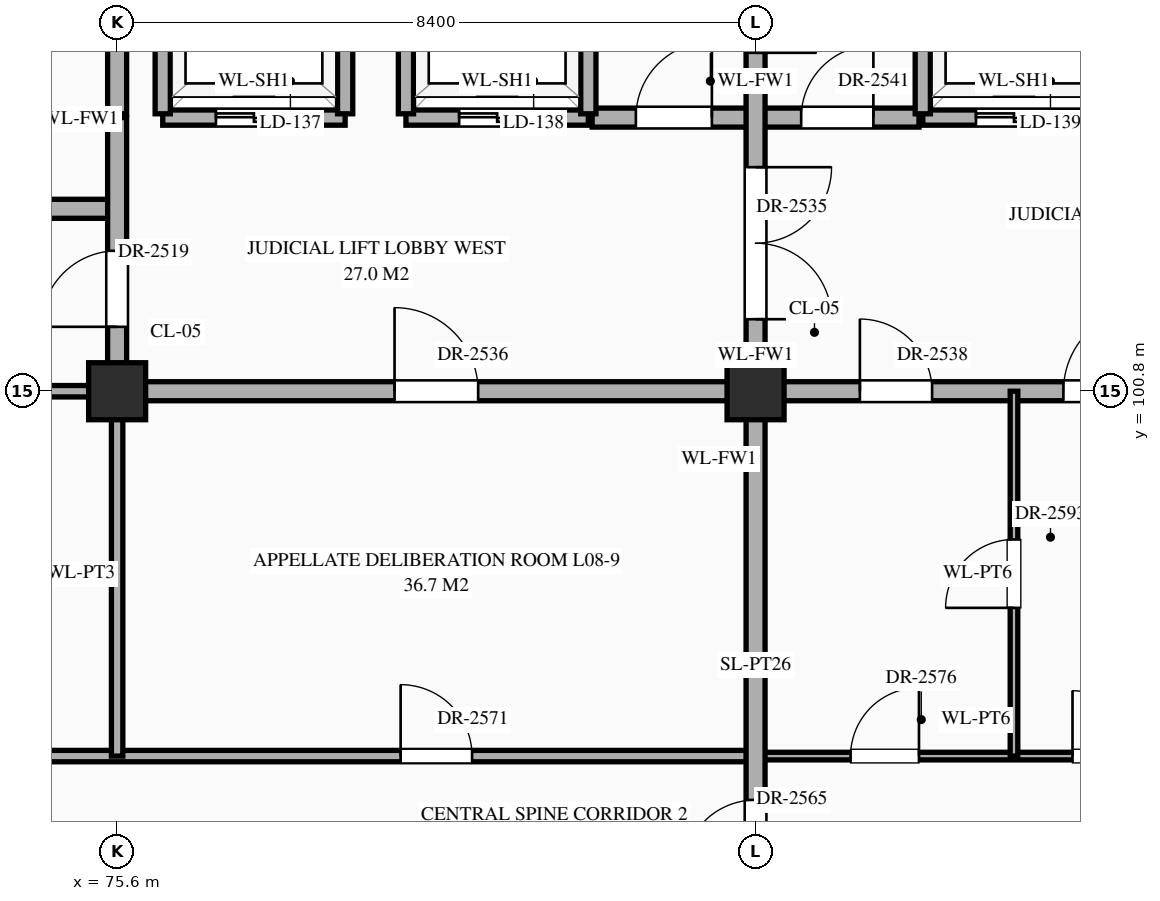
"""IFC4 building model, lengths in metres.
Left out: names, types, materials, properties, quantities, classifications, styles, units other than length and angle.
Written with IfcOpenShell. Run it as: python <this file> out.ifc"""

import sys

from ifc_helpers import new_model, si_unit, direction, frame, frame_2d, origin, origin_2d, place, context, subcontext, project, spatial, rectangle, extrude, element, fill, save


model = new_model("IFC4")
c1 = context("Model", 3, precision=1e-05, world=origin(), true_north=direction((0.0, 1.0)))
c2 = subcontext(c1, "Body", "Model", "MODEL_VIEW")
j1 = project(units=[si_unit("LENGTHUNIT", "METRE"), si_unit("PLANEANGLEUNIT", "RADIAN")], contexts=[c1])
p1 = place(None, origin())
s1 = spatial("IfcSite", under=j1, at=p1, CompositionType="ELEMENT")
p2 = place(p1, origin())
s2 = spatial("IfcBuilding", under=s1, at=p2, CompositionType="ELEMENT")
p3 = place(p2, frame((0.0, 0.0, 35.1)))
s3 = spatial("IfcBuildingStorey", under=s2, at=p3, CompositionType="ELEMENT", Elevation=35.1)
for number, where, z_axis, x_axis in (
    (1, (75.6, 100.8, 0.0), (0.0, 0.0, 1.0), (1.0, 0.0, 0.0)),
    (2, (84.0, 100.8, 0.0), (0.0, 0.0, 1.0), (1.0, 0.0, 0.0)),
):
    element("IfcColumn", number, at=place(p3, frame(where, z_axis=z_axis, x_axis=x_axis)), inside=s3, PredefinedType="COLUMN", context=c2, shape_type="SweptSolid", body=[
        extrude(rectangle(XDim=0.75, YDim=0.75, at=origin_2d()), origin(), (0.0, 0.0, 1.0), 4.2),
    ])
p4 = place(p3, frame((56.2, 96.0, 0.0), z_axis=(0.0, 0.0, 1.0), x_axis=(1.0, 0.0, 0.0)))
e3 = element("IfcWall", 3, at=p4, inside=s3, PredefinedType="STANDARD", context=c2, shape_type="SweptSolid", body=[
    extrude(rectangle(XDim=27.8, YDim=0.15, at=frame_2d((13.9, 0.0))), origin(), (0.0, 0.0, 1.0), 3.95),
])
p5 = place(p4, frame((0.7, 0.0, 0.0)))
e4 = element("IfcOpeningElement", 4, at=p5, cuts=e3, PredefinedType="OPENING", context=c2, shape_type="SweptSolid", body=[
    extrude(rectangle(XDim=1.2, YDim=2.35, at=frame_2d((0.6, 1.175))), frame((0.0, 0.087, 0.0), z_axis=(0.0, -1.0, 0.0), x_axis=(1.0, 0.0, 0.0)), (0.0, 0.0, 1.0), 0.174),
])
p6 = place(p4, frame((6.18, 0.0, 0.0)))
e5 = element("IfcOpeningElement", 5, at=p6, cuts=e3, PredefinedType="OPENING", context=c2, shape_type="SweptSolid", body=[
    extrude(rectangle(XDim=1.24, YDim=2.3, at=frame_2d((0.62, 1.15))), frame((0.0, 0.087, 0.0), z_axis=(0.0, -1.0, 0.0), x_axis=(1.0, 0.0, 0.0)), (0.0, 0.0, 1.0), 0.174),
])
p7 = place(p4, frame((14.56, 0.0, 0.0)))
e6 = element("IfcOpeningElement", 6, at=p7, cuts=e3, PredefinedType="OPENING", context=c2, shape_type="SweptSolid", body=[
    extrude(rectangle(XDim=1.28, YDim=2.35, at=frame_2d((0.64, 1.175))), frame((0.0, 0.087, 0.0), z_axis=(0.0, -1.0, 0.0), x_axis=(1.0, 0.0, 0.0)), (0.0, 0.0, 1.0), 0.174),
])
p8 = place(p4, frame((23.13, 0.0, 0.0)))
e7 = element("IfcOpeningElement", 7, at=p8, cuts=e3, PredefinedType="OPENING", context=c2, shape_type="SweptSolid", body=[
    extrude(rectangle(XDim=0.94, YDim=2.3, at=frame_2d((0.47, 1.15))), frame((0.0, 0.087, 0.0), z_axis=(0.0, -1.0, 0.0), x_axis=(1.0, 0.0, 0.0)), (0.0, 0.0, 1.0), 0.174),
])
p9 = place(p3, frame((84.0, 96.0, 0.0), z_axis=(0.0, 0.0, 1.0), x_axis=(1.0, 0.0, 0.0)))
e8 = element("IfcWall", 8, at=p9, inside=s3, PredefinedType="STANDARD", context=c2, shape_type="SweptSolid", body=[
    extrude(rectangle(XDim=5.8, YDim=0.1, at=frame_2d((2.9, 0.0))), origin(), (0.0, 0.0, 1.0), 3.95),
])
p10 = place(p9, frame((1.25, 0.0, 0.0)))
e9 = element("IfcOpeningElement", 9, at=p10, cuts=e8, PredefinedType="OPENING", context=c2, shape_type="SweptSolid", body=[
    extrude(rectangle(XDim=0.9, YDim=2.15, at=frame_2d((0.45, 1.075))), frame((0.0, 0.062, 0.0), z_axis=(0.0, -1.0, 0.0), x_axis=(1.0, 0.0, 0.0)), (0.0, 0.0, 1.0), 0.124),
])
p11 = place(p9, frame((4.17, 0.0, 0.0)))
e10 = element("IfcOpeningElement", 10, at=p11, cuts=e8, PredefinedType="OPENING", context=c2, shape_type="SweptSolid", body=[
    extrude(rectangle(XDim=0.86, YDim=2.1, at=frame_2d((0.43, 1.05))), frame((0.0, 0.062, 0.0), z_axis=(0.0, -1.0, 0.0), x_axis=(1.0, 0.0, 0.0)), (0.0, 0.0, 1.0), 0.124),
])
p12 = place(p3, frame((71.4, 100.8, 0.0), z_axis=(0.0, 0.0, 1.0), x_axis=(1.0, 0.0, 0.0)))
e11 = element("IfcWall", 11, at=p12, inside=s3, PredefinedType="STANDARD", context=c2, shape_type="SweptSolid", body=[
    extrude(rectangle(XDim=4.2, YDim=0.15, at=frame_2d((2.1, 0.0))), origin(), (0.0, 0.0, 1.0), 3.1),
])
p13 = place(p12, frame((1.482, 0.0, 0.0)))
e12 = element("IfcOpeningElement", 12, at=p13, cuts=e11, PredefinedType="OPENING", context=c2, shape_type="SweptSolid", body=[
    extrude(rectangle(XDim=0.94, YDim=2.3, at=frame_2d((0.47, 1.15))), frame((0.0, 0.087, 0.0), z_axis=(0.0, -1.0, 0.0), x_axis=(1.0, 0.0, 0.0)), (0.0, 0.0, 1.0), 0.174),
])
p14 = place(p3, frame((75.6, 100.8, 0.0), z_axis=(0.0, 0.0, 1.0), x_axis=(1.0, 0.0, 0.0)))
e13 = element("IfcWall", 13, at=p14, inside=s3, PredefinedType="STANDARD", context=c2, shape_type="SweptSolid", body=[
    extrude(rectangle(XDim=16.8, YDim=0.25, at=frame_2d((8.4, 0.0))), origin(), (0.0, 0.0, 1.0), 3.1),
])
p15 = place(p14, frame((3.65, 0.0, 0.0)))
e14 = element("IfcOpeningElement", 14, at=p15, cuts=e13, PredefinedType="OPENING", context=c2, shape_type="SweptSolid", body=[
    extrude(rectangle(XDim=1.1, YDim=2.2, at=frame_2d((0.55, 1.1))), frame((0.0, 0.137, 0.0), z_axis=(0.0, -1.0, 0.0), x_axis=(1.0, 0.0, 0.0)), (0.0, 0.0, 1.0), 0.274),
])
p16 = place(p14, frame((9.772, 0.0, 0.0)))
e15 = element("IfcOpeningElement", 15, at=p16, cuts=e13, PredefinedType="OPENING", context=c2, shape_type="SweptSolid", body=[
    extrude(rectangle(XDim=0.95, YDim=2.15, at=frame_2d((0.475, 1.075))), frame((0.0, 0.137, 0.0), z_axis=(0.0, -1.0, 0.0), x_axis=(1.0, 0.0, 0.0)), (0.0, 0.0, 1.0), 0.274),
])
p17 = place(p14, frame((12.45, 0.0, 0.0)))
e16 = element("IfcOpeningElement", 16, at=p17, cuts=e13, PredefinedType="OPENING", context=c2, shape_type="SweptSolid", body=[
    extrude(rectangle(XDim=1.1, YDim=2.2, at=frame_2d((0.55, 1.1))), frame((0.0, 0.137, 0.0), z_axis=(0.0, -1.0, 0.0), x_axis=(1.0, 0.0, 0.0)), (0.0, 0.0, 1.0), 0.274),
])
p18 = place(p14, frame((14.853, 0.0, 0.0)))
e17 = element("IfcOpeningElement", 17, at=p18, cuts=e13, PredefinedType="OPENING", context=c2, shape_type="SweptSolid", body=[
    extrude(rectangle(XDim=1.0, YDim=2.2, at=frame_2d((0.5, 1.1))), frame((0.0, 0.137, 0.0), z_axis=(0.0, -1.0, 0.0), x_axis=(1.0, 0.0, 0.0)), (0.0, 0.0, 1.0), 0.274),
])
p19 = place(p3, frame((71.4, 103.2, 0.0), z_axis=(0.0, 0.0, 1.0), x_axis=(1.0, 0.0, 0.0)))
e18 = element("IfcWall", 18, at=p19, inside=s3, PredefinedType="STANDARD", context=c2, shape_type="SweptSolid", body=[
    extrude(rectangle(XDim=4.2, YDim=0.25, at=frame_2d((2.1, 0.0))), origin(), (0.0, 0.0, 1.0), 3.95),
])
p20 = place(p19, frame((1.55, 0.0, 0.0)))
e19 = element("IfcOpeningElement", 19, at=p20, cuts=e18, PredefinedType="OPENING", context=c2, shape_type="SweptSolid", body=[
    extrude(rectangle(XDim=1.1, YDim=2.2, at=frame_2d((0.55, 1.1))), frame((0.0, 0.137, 0.0), z_axis=(0.0, -1.0, 0.0), x_axis=(1.0, 0.0, 0.0)), (0.0, 0.0, 1.0), 0.274),
])
p21 = place(p3, frame((76.2, 104.4, 0.0), z_axis=(0.0, 0.0, 1.0), x_axis=(1.0, 0.0, 0.0)))
e20 = element("IfcWall", 20, at=p21, inside=s3, PredefinedType="STANDARD", context=c2, shape_type="SweptSolid", body=[
    extrude(rectangle(XDim=2.4, YDim=0.2, at=frame_2d((1.2, 0.0))), origin(), (0.0, 0.0, 1.0), 3.95),
])
p22 = place(p21, frame((0.7, 0.0, 0.0)))
e21 = element("IfcOpeningElement", 21, at=p22, cuts=e20, PredefinedType="OPENING", context=c2, shape_type="SweptSolid", body=[
    extrude(rectangle(XDim=1.0, YDim=2.15, at=frame_2d((0.5, 1.075))), frame((0.0, 0.112, 0.0), z_axis=(0.0, -1.0, 0.0), x_axis=(1.0, 0.0, 0.0)), (0.0, 0.0, 1.0), 0.224),
])
p23 = place(p3, frame((79.4, 104.4, 0.0), z_axis=(0.0, 0.0, 1.0), x_axis=(1.0, 0.0, 0.0)))
e22 = element("IfcWall", 22, at=p23, inside=s3, PredefinedType="STANDARD", context=c2, shape_type="SweptSolid", body=[
    extrude(rectangle(XDim=2.4, YDim=0.2, at=frame_2d((1.2, 0.0))), origin(), (0.0, 0.0, 1.0), 3.95),
])
p24 = place(p23, frame((0.7, 0.0, 0.0)))
e23 = element("IfcOpeningElement", 23, at=p24, cuts=e22, PredefinedType="OPENING", context=c2, shape_type="SweptSolid", body=[
    extrude(rectangle(XDim=1.0, YDim=2.15, at=frame_2d((0.5, 1.075))), frame((0.0, 0.112, 0.0), z_axis=(0.0, -1.0, 0.0), x_axis=(1.0, 0.0, 0.0)), (0.0, 0.0, 1.0), 0.224),
])
p25 = place(p3, frame((81.85, 104.4, 0.0), z_axis=(0.0, 0.0, 1.0), x_axis=(1.0, 0.0, 0.0)))
e24 = element("IfcWall", 24, at=p25, inside=s3, PredefinedType="STANDARD", context=c2, shape_type="SweptSolid", body=[
    extrude(rectangle(XDim=4.3, YDim=0.25, at=frame_2d((2.15, 0.0))), origin(), (0.0, 0.0, 1.0), 3.95),
])
p26 = place(p25, frame((0.575, 0.0, 0.0)))
e25 = element("IfcOpeningElement", 25, at=p26, cuts=e24, PredefinedType="OPENING", context=c2, shape_type="SweptSolid", body=[
    extrude(rectangle(XDim=1.0, YDim=2.2, at=frame_2d((0.5, 1.1))), frame((0.0, 0.137, 0.0), z_axis=(0.0, -1.0, 0.0), x_axis=(1.0, 0.0, 0.0)), (0.0, 0.0, 1.0), 0.274),
])
p27 = place(p25, frame((2.75, 0.0, 0.0)))
e26 = element("IfcOpeningElement", 26, at=p27, cuts=e24, PredefinedType="OPENING", context=c2, shape_type="SweptSolid", body=[
    extrude(rectangle(XDim=0.95, YDim=2.15, at=frame_2d((0.475, 1.075))), frame((0.0, 0.137, 0.0), z_axis=(0.0, -1.0, 0.0), x_axis=(1.0, 0.0, 0.0)), (0.0, 0.0, 1.0), 0.274),
])
p28 = place(p3, frame((86.2, 104.4, 0.0), z_axis=(0.0, 0.0, 1.0), x_axis=(1.0, 0.0, 0.0)))
e27 = element("IfcWall", 27, at=p28, inside=s3, PredefinedType="STANDARD", context=c2, shape_type="SweptSolid", body=[
    extrude(rectangle(XDim=2.4, YDim=0.2, at=frame_2d((1.2, 0.0))), origin(), (0.0, 0.0, 1.0), 3.95),
])
p29 = place(p28, frame((0.7, 0.0, 0.0)))
e28 = element("IfcOpeningElement", 28, at=p29, cuts=e27, PredefinedType="OPENING", context=c2, shape_type="SweptSolid", body=[
    extrude(rectangle(XDim=1.0, YDim=2.15, at=frame_2d((0.5, 1.075))), frame((0.0, 0.112, 0.0), z_axis=(0.0, -1.0, 0.0), x_axis=(1.0, 0.0, 0.0)), (0.0, 0.0, 1.0), 0.224),
])
p30 = place(p3, frame((75.6, 96.0, 0.0), z_axis=(0.0, 0.0, 1.0), x_axis=(0.0, 1.0, 0.0)))
e29 = element("IfcWall", 29, at=p30, inside=s3, PredefinedType="STANDARD", context=c2, shape_type="SweptSolid", body=[
    extrude(rectangle(XDim=4.8, YDim=0.15, at=frame_2d((2.4, 0.0))), origin(), (0.0, 0.0, 1.0), 3.2),
])
p31 = place(p3, frame((75.6, 100.8, 0.0), z_axis=(0.0, 0.0, 1.0), x_axis=(0.0, 1.0, 0.0)))
e30 = element("IfcWall", 30, at=p31, inside=s3, PredefinedType="STANDARD", context=c2, shape_type="SweptSolid", body=[
    extrude(rectangle(XDim=3.6, YDim=0.25, at=frame_2d((1.8, 0.0))), origin(), (0.0, 0.0, 1.0), 3.2),
])
p32 = place(p31, frame((0.847, 0.0, 0.0)))
e31 = element("IfcOpeningElement", 31, at=p32, cuts=e30, PredefinedType="OPENING", context=c2, shape_type="SweptSolid", body=[
    extrude(rectangle(XDim=1.0, YDim=2.2, at=frame_2d((0.5, 1.1))), frame((0.0, 0.137, 0.0), z_axis=(0.0, -1.0, 0.0), x_axis=(1.0, 0.0, 0.0)), (0.0, 0.0, 1.0), 0.274),
])
p33 = place(p3, frame((75.6, 104.45, 0.0), z_axis=(0.0, 0.0, 1.0), x_axis=(0.0, 1.0, 0.0)))
e32 = element("IfcWall", 32, at=p33, inside=s3, PredefinedType="STANDARD", context=c2, shape_type="SweptSolid", body=[
    extrude(rectangle(XDim=3.5, YDim=0.25, at=frame_2d((1.75, 0.0))), origin(), (0.0, 0.0, 1.0), 3.2),
])
for number, where, z_axis, x_axis in (
    (33, (76.2, 104.45, 0.0), (0.0, 0.0, 1.0), (0.0, 1.0, 0.0)),
    (34, (78.6, 104.45, 0.0), (0.0, 0.0, 1.0), (0.0, 1.0, 0.0)),
    (35, (79.4, 104.45, 0.0), (0.0, 0.0, 1.0), (0.0, 1.0, 0.0)),
    (36, (81.8, 104.45, 0.0), (0.0, 0.0, 1.0), (0.0, 1.0, 0.0)),
):
    element("IfcWall", number, at=place(p3, frame(where, z_axis=z_axis, x_axis=x_axis)), inside=s3, PredefinedType="STANDARD", context=c2, shape_type="SweptSolid", body=[
        extrude(rectangle(XDim=2.3, YDim=0.2, at=frame_2d((1.15, 0.0))), origin(), (0.0, 0.0, 1.0), 3.95),
    ])
p34 = place(p3, frame((84.0, 84.65, 0.0), z_axis=(0.0, 0.0, 1.0), x_axis=(0.0, 1.0, 0.0)))
e37 = element("IfcWall", 37, at=p34, inside=s3, PredefinedType="STANDARD", context=c2, shape_type="SweptSolid", body=[
    extrude(rectangle(XDim=30.51, YDim=0.25, at=frame_2d((15.255, 0.0))), origin(), (0.0, 0.0, 1.0), 3.2),
])
p35 = place(p34, frame((17.097, 0.0, 0.0)))
e38 = element("IfcOpeningElement", 38, at=p35, cuts=e37, PredefinedType="OPENING", context=c2, shape_type="SweptSolid", body=[
    extrude(rectangle(XDim=2.0, YDim=2.4, at=frame_2d((1.0, 1.2))), frame((0.0, 0.137, 0.0), z_axis=(0.0, -1.0, 0.0), x_axis=(1.0, 0.0, 0.0)), (0.0, 0.0, 1.0), 0.274),
])
p36 = place(p34, frame((7.127, 0.0, 0.0)))
e39 = element("IfcOpeningElement", 39, at=p36, cuts=e37, PredefinedType="OPENING", context=c2, shape_type="SweptSolid", body=[
    extrude(rectangle(XDim=0.95, YDim=2.15, at=frame_2d((0.475, 1.075))), frame((0.0, 0.137, 0.0), z_axis=(0.0, -1.0, 0.0), x_axis=(1.0, 0.0, 0.0)), (0.0, 0.0, 1.0), 0.274),
])
p37 = place(p34, frame((9.823, 0.0, 0.0)))
e40 = element("IfcOpeningElement", 40, at=p37, cuts=e37, PredefinedType="OPENING", context=c2, shape_type="SweptSolid", body=[
    extrude(rectangle(XDim=0.95, YDim=2.15, at=frame_2d((0.475, 1.075))), frame((0.0, 0.137, 0.0), z_axis=(0.0, -1.0, 0.0), x_axis=(1.0, 0.0, 0.0)), (0.0, 0.0, 1.0), 0.274),
])
p38 = place(p34, frame((20.603, 0.0, 0.0)))
e41 = element("IfcOpeningElement", 41, at=p38, cuts=e37, PredefinedType="OPENING", context=c2, shape_type="SweptSolid", body=[
    extrude(rectangle(XDim=1.6, YDim=2.3, at=frame_2d((0.8, 1.15))), frame((0.0, 0.137, 0.0), z_axis=(0.0, -1.0, 0.0), x_axis=(1.0, 0.0, 0.0)), (0.0, 0.0, 1.0), 0.274),
])
p39 = place(p34, frame((23.873, 0.0, 0.0)))
e42 = element("IfcOpeningElement", 42, at=p39, cuts=e37, PredefinedType="OPENING", context=c2, shape_type="SweptSolid", body=[
    extrude(rectangle(XDim=1.0, YDim=2.2, at=frame_2d((0.5, 1.1))), frame((0.0, 0.137, 0.0), z_axis=(0.0, -1.0, 0.0), x_axis=(1.0, 0.0, 0.0)), (0.0, 0.0, 1.0), 0.274),
])
p40 = place(p34, frame((0.228, 0.0, 0.0)))
e43 = element("IfcOpeningElement", 43, at=p40, cuts=e37, PredefinedType="OPENING", context=c2, shape_type="SweptSolid", body=[
    extrude(rectangle(XDim=1.0, YDim=2.2, at=frame_2d((0.5, 1.1))), frame((0.0, 0.137, 0.0), z_axis=(0.0, -1.0, 0.0), x_axis=(1.0, 0.0, 0.0)), (0.0, 0.0, 1.0), 0.274),
])
p41 = place(p3, frame((86.2, 104.45, 0.0), z_axis=(0.0, 0.0, 1.0), x_axis=(0.0, 1.0, 0.0)))
e44 = element("IfcWall", 44, at=p41, inside=s3, PredefinedType="STANDARD", context=c2, shape_type="SweptSolid", body=[
    extrude(rectangle(XDim=2.3, YDim=0.2, at=frame_2d((1.15, 0.0))), origin(), (0.0, 0.0, 1.0), 3.95),
])
p42 = place(p3, frame((87.4, 96.0, 0.0), z_axis=(0.0, 0.0, 1.0), x_axis=(0.0, 1.0, 0.0)))
e45 = element("IfcWall", 45, at=p42, inside=s3, PredefinedType="STANDARD", context=c2, shape_type="SweptSolid", body=[
    extrude(rectangle(XDim=4.8, YDim=0.1, at=frame_2d((2.4, 0.0))), origin(), (0.0, 0.0, 1.0), 3.95),
])
p43 = place(p42, frame((1.95, 0.0, 0.0)))
e46 = element("IfcOpeningElement", 46, at=p43, cuts=e45, PredefinedType="OPENING", context=c2, shape_type="SweptSolid", body=[
    extrude(rectangle(XDim=0.9, YDim=2.15, at=frame_2d((0.45, 1.075))), frame((0.0, 0.062, 0.0), z_axis=(0.0, -1.0, 0.0), x_axis=(1.0, 0.0, 0.0)), (0.0, 0.0, 1.0), 0.124),
])
p44 = place(p22, origin())
e47 = element("IfcDoor", 47, at=p44, inside=s3, OperationType="DOUBLE_DOOR_SLIDING", PredefinedType="DOOR", context=c2, shape_type="SweptSolid", body=[
    extrude(rectangle(XDim=1.0, YDim=2.15, at=frame_2d((0.5, 1.075))), frame((0.0, 0.025, 0.0), z_axis=(0.0, -1.0, 0.0), x_axis=(1.0, 0.0, 0.0)), (0.0, 0.0, 1.0), 0.05),
])
fill(e21, e47)
p45 = place(p24, origin())
e48 = element("IfcDoor", 48, at=p45, inside=s3, OperationType="DOUBLE_DOOR_SLIDING", PredefinedType="DOOR", context=c2, shape_type="SweptSolid", body=[
    extrude(rectangle(XDim=1.0, YDim=2.15, at=frame_2d((0.5, 1.075))), frame((0.0, 0.025, 0.0), z_axis=(0.0, -1.0, 0.0), x_axis=(1.0, 0.0, 0.0)), (0.0, 0.0, 1.0), 0.05),
])
fill(e23, e48)
p46 = place(p29, origin())
e49 = element("IfcDoor", 49, at=p46, inside=s3, OperationType="DOUBLE_DOOR_SLIDING", PredefinedType="DOOR", context=c2, shape_type="SweptSolid", body=[
    extrude(rectangle(XDim=1.0, YDim=2.15, at=frame_2d((0.5, 1.075))), frame((0.0, 0.025, 0.0), z_axis=(0.0, -1.0, 0.0), x_axis=(1.0, 0.0, 0.0)), (0.0, 0.0, 1.0), 0.05),
])
fill(e28, e49)
p47 = place(p32, origin())
e50 = element("IfcDoor", 50, at=p47, inside=s3, OperationType="SINGLE_SWING_LEFT", PredefinedType="DOOR", context=c2, shape_type="SweptSolid", body=[
    extrude(rectangle(XDim=1.0, YDim=2.2, at=frame_2d((0.5, 1.1))), frame((0.0, 0.025, 0.0), z_axis=(0.0, -1.0, 0.0), x_axis=(1.0, 0.0, 0.0)), (0.0, 0.0, 1.0), 0.05),
])
fill(e31, e50)
p48 = place(p35, frame((2.0, 0.0, 0.0), z_axis=(0.0, 0.0, 1.0), x_axis=(-1.0, 0.0, 0.0)))
e51 = element("IfcDoor", 51, at=p48, inside=s3, OperationType="DOUBLE_DOOR_SINGLE_SWING", PredefinedType="DOOR", context=c2, shape_type="SweptSolid", body=[
    extrude(rectangle(XDim=2.0, YDim=2.4, at=frame_2d((1.0, 1.2))), frame((0.0, 0.025, 0.0), z_axis=(0.0, -1.0, 0.0), x_axis=(1.0, 0.0, 0.0)), (0.0, 0.0, 1.0), 0.05),
])
fill(e38, e51)
p49 = place(p15, origin())
e52 = element("IfcDoor", 52, at=p49, inside=s3, OperationType="SINGLE_SWING_LEFT", PredefinedType="DOOR", context=c2, shape_type="SweptSolid", body=[
    extrude(rectangle(XDim=1.1, YDim=2.2, at=frame_2d((0.55, 1.1))), frame((0.0, 0.025, 0.0), z_axis=(0.0, -1.0, 0.0), x_axis=(1.0, 0.0, 0.0)), (0.0, 0.0, 1.0), 0.05),
])
fill(e14, e52)
p50 = place(p26, origin())
e53 = element("IfcDoor", 53, at=p50, inside=s3, OperationType="SINGLE_SWING_RIGHT", PredefinedType="DOOR", context=c2, shape_type="SweptSolid", body=[
    extrude(rectangle(XDim=1.0, YDim=2.2, at=frame_2d((0.5, 1.1))), frame((0.0, 0.025, 0.0), z_axis=(0.0, -1.0, 0.0), x_axis=(1.0, 0.0, 0.0)), (0.0, 0.0, 1.0), 0.05),
])
fill(e25, e53)
p51 = place(p16, origin())
e54 = element("IfcDoor", 54, at=p51, inside=s3, OperationType="SINGLE_SWING_LEFT", PredefinedType="DOOR", context=c2, shape_type="SweptSolid", body=[
    extrude(rectangle(XDim=0.95, YDim=2.15, at=frame_2d((0.475, 1.075))), frame((0.0, 0.025, 0.0), z_axis=(0.0, -1.0, 0.0), x_axis=(1.0, 0.0, 0.0)), (0.0, 0.0, 1.0), 0.05),
])
fill(e15, e54)
p52 = place(p17, origin())
e55 = element("IfcDoor", 55, at=p52, inside=s3, OperationType="SINGLE_SWING_RIGHT", PredefinedType="DOOR", context=c2, shape_type="SweptSolid", body=[
    extrude(rectangle(XDim=1.1, YDim=2.2, at=frame_2d((0.55, 1.1))), frame((0.0, 0.025, 0.0), z_axis=(0.0, -1.0, 0.0), x_axis=(1.0, 0.0, 0.0)), (0.0, 0.0, 1.0), 0.05),
])
fill(e16, e55)
p53 = place(p27, origin())
e56 = element("IfcDoor", 56, at=p53, inside=s3, OperationType="SINGLE_SWING_RIGHT", PredefinedType="DOOR", context=c2, shape_type="SweptSolid", body=[
    extrude(rectangle(XDim=0.95, YDim=2.15, at=frame_2d((0.475, 1.075))), frame((0.0, 0.025, 0.0), z_axis=(0.0, -1.0, 0.0), x_axis=(1.0, 0.0, 0.0)), (0.0, 0.0, 1.0), 0.05),
])
fill(e26, e56)
p54 = place(p37, origin())
e57 = element("IfcDoor", 57, at=p54, inside=s3, OperationType="SINGLE_SWING_LEFT", PredefinedType="DOOR", context=c2, shape_type="SweptSolid", body=[
    extrude(rectangle(XDim=0.95, YDim=2.15, at=frame_2d((0.475, 1.075))), frame((0.0, 0.025, 0.0), z_axis=(0.0, -1.0, 0.0), x_axis=(1.0, 0.0, 0.0)), (0.0, 0.0, 1.0), 0.05),
])
fill(e40, e57)
p55 = place(p8, origin())
e58 = element("IfcDoor", 58, at=p55, inside=s3, OperationType="SINGLE_SWING_LEFT", PredefinedType="DOOR", context=c2, shape_type="SweptSolid", body=[
    extrude(rectangle(XDim=0.94, YDim=2.3, at=frame_2d((0.47, 1.15))), frame((0.0, 0.025, 0.0), z_axis=(0.0, -1.0, 0.0), x_axis=(1.0, 0.0, 0.0)), (0.0, 0.0, 1.0), 0.05),
])
fill(e7, e58)
p56 = place(p10, origin())
e59 = element("IfcDoor", 59, at=p56, inside=s3, OperationType="SINGLE_SWING_RIGHT", PredefinedType="DOOR", context=c2, shape_type="SweptSolid", body=[
    extrude(rectangle(XDim=0.9, YDim=2.15, at=frame_2d((0.45, 1.075))), frame((0.0, 0.025, 0.0), z_axis=(0.0, -1.0, 0.0), x_axis=(1.0, 0.0, 0.0)), (0.0, 0.0, 1.0), 0.05),
])
fill(e9, e59)
p57 = place(p11, origin())
e60 = element("IfcDoor", 60, at=p57, inside=s3, OperationType="SINGLE_SWING_LEFT", PredefinedType="DOOR", context=c2, shape_type="SweptSolid", body=[
    extrude(rectangle(XDim=0.86, YDim=2.1, at=frame_2d((0.43, 1.05))), frame((0.0, 0.025, 0.0), z_axis=(0.0, -1.0, 0.0), x_axis=(1.0, 0.0, 0.0)), (0.0, 0.0, 1.0), 0.05),
])
fill(e10, e60)
p58 = place(p43, origin())
e61 = element("IfcDoor", 61, at=p58, inside=s3, OperationType="SINGLE_SWING_LEFT", PredefinedType="DOOR", context=c2, shape_type="SweptSolid", body=[
    extrude(rectangle(XDim=0.9, YDim=2.15, at=frame_2d((0.45, 1.075))), frame((0.0, 0.025, 0.0), z_axis=(0.0, -1.0, 0.0), x_axis=(1.0, 0.0, 0.0)), (0.0, 0.0, 1.0), 0.05),
])
fill(e46, e61)
p59 = place(p38, frame((1.6, 0.0, 0.0), z_axis=(0.0, 0.0, 1.0), x_axis=(-1.0, 0.0, 0.0)))
e62 = element("IfcDoor", 62, at=p59, inside=s3, OperationType="DOUBLE_DOOR_SINGLE_SWING", PredefinedType="DOOR", context=c2, shape_type="SweptSolid", body=[
    extrude(rectangle(XDim=1.6, YDim=2.3, at=frame_2d((0.8, 1.15))), frame((0.0, 0.025, 0.0), z_axis=(0.0, -1.0, 0.0), x_axis=(1.0, 0.0, 0.0)), (0.0, 0.0, 1.0), 0.05),
])
fill(e41, e62)
save(model, sys.argv[1])
